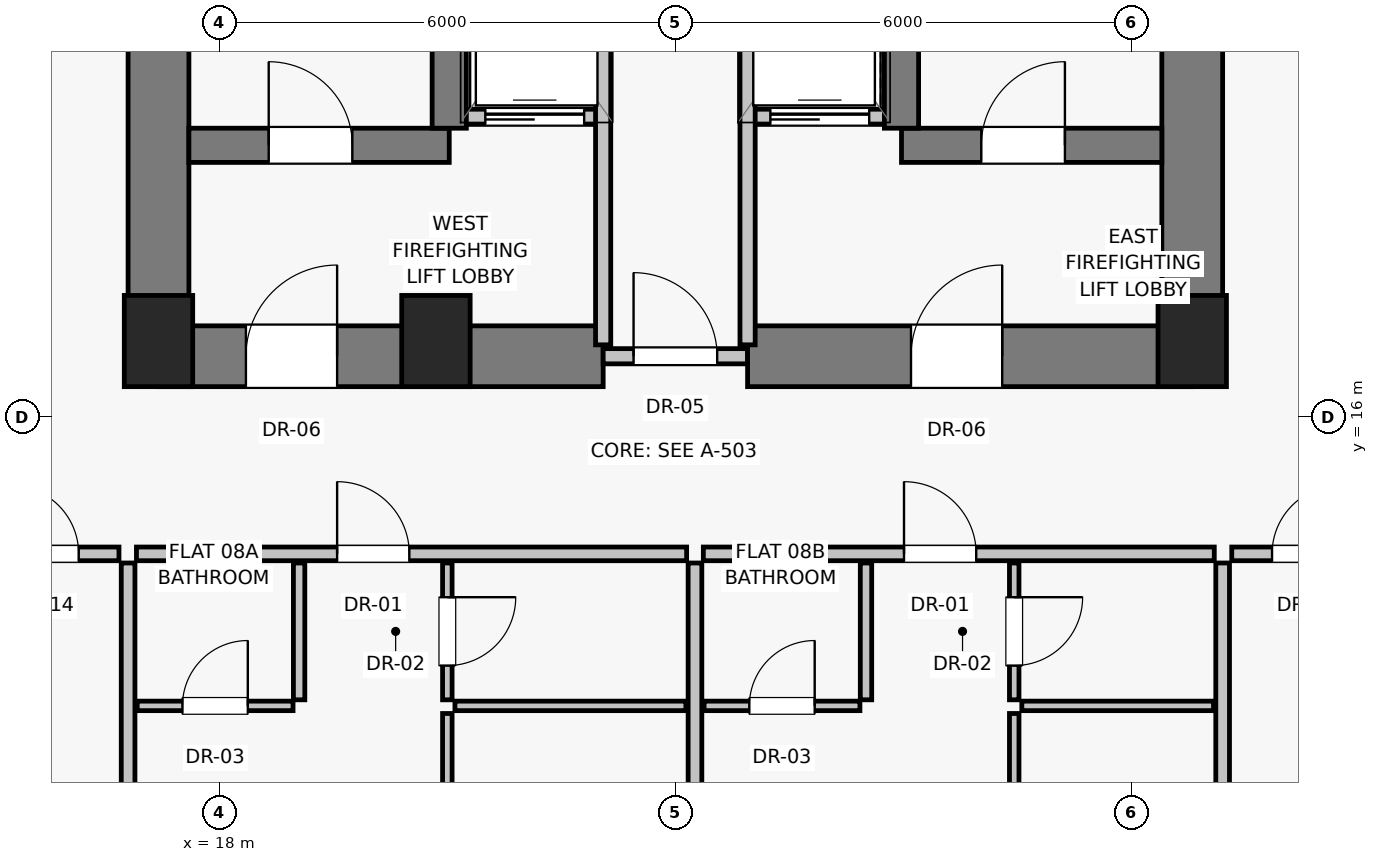
"""IFC4 building model, lengths in metres.
Left out: names, types, materials, properties, quantities, classifications, styles, units other than length and angle.
Written with IfcOpenShell. Run it as: python <this file> out.ifc"""

import sys

from ifc_helpers import new_model, si_unit, direction, frame, frame_2d, origin, origin_2d, place, context, subcontext, project, spatial, rectangle, extrude, source, transform, mapped, element, fill, save


model = new_model("IFC4")
c1 = context("Model", 3, precision=1e-05, world=origin(), true_north=direction((0.0, 1.0)))
c2 = subcontext(c1, "Body", "Model", "MODEL_VIEW")
j1 = project(units=[si_unit("LENGTHUNIT", "METRE"), si_unit("PLANEANGLEUNIT", "RADIAN")], contexts=[c1])
p1 = place(None, origin())
s1 = spatial("IfcSite", under=j1, at=p1, CompositionType="ELEMENT")
p2 = place(p1, origin())
s2 = spatial("IfcBuilding", under=s1, at=p2, CompositionType="ELEMENT")
p3 = place(p2, frame((0.0, 0.0, 33.8)))
s3 = spatial("IfcBuildingStorey", under=s2, at=p3, CompositionType="ELEMENT", Elevation=33.8)
for number, where, z_axis, x_axis in (
    (1, (17.2, 17.0, 0.0), (0.0, 0.0, 1.0), (1.0, 0.0, 0.0)),
    (2, (20.85, 17.0, 0.0), (0.0, 0.0, 1.0), (1.0, 0.0, 0.0)),
    (3, (30.8, 17.0, 0.0), (0.0, 0.0, 1.0), (1.0, 0.0, 0.0)),
):
    element("IfcColumn", number, at=place(p3, frame(where, z_axis=z_axis, x_axis=x_axis)), inside=s3, PredefinedType="PILASTER", context=c2, shape_type="SweptSolid", body=[
        extrude(rectangle(XDim=0.9, YDim=1.2, at=origin_2d()), origin(), (0.0, 0.0, 1.0), 3.25),
    ])
for number, where, z_axis, x_axis in (
    (4, (17.2, 16.8, 0.0), (0.0, 0.0, 1.0), (0.0, 1.0, 0.0)),
    (5, (30.8, 16.8, 0.0), (0.0, 0.0, 1.0), (0.0, 1.0, 0.0)),
):
    element("IfcWall", number, at=place(p3, frame(where, z_axis=z_axis, x_axis=x_axis)), inside=s3, PredefinedType="SHEAR", context=c2, shape_type="SweptSolid", body=[
        extrude(rectangle(XDim=14.2, YDim=0.8, at=frame_2d((7.1, 0.0))), origin(), (0.0, 0.0, 1.0), 3.0),
    ])
p4 = place(p3, frame((17.2, 16.8, 0.0), z_axis=(0.0, 0.0, 1.0), x_axis=(1.0, 0.0, 0.0)))
e6 = element("IfcWall", 6, at=p4, inside=s3, PredefinedType="SHEAR", context=c2, shape_type="SweptSolid", body=[
    extrude(rectangle(XDim=5.85, YDim=0.8, at=frame_2d((2.925, 0.0))), origin(), (0.0, 0.0, 1.0), 3.0),
])
p5 = place(p4, frame((1.15, 0.0, 0.0)))
e7 = element("IfcOpeningElement", 7, at=p5, cuts=e6, PredefinedType="OPENING", context=c2, shape_type="SweptSolid", body=[
    extrude(rectangle(XDim=1.2, YDim=2.03, at=frame_2d((0.6, 1.015))), frame((0.0, 0.41, 0.0), z_axis=(0.0, -1.0, 0.0), x_axis=(1.0, 0.0, 0.0)), (0.0, 0.0, 1.0), 0.82),
])
p6 = place(p3, frame((23.05, 16.8, 0.0), z_axis=(0.0, 0.0, 1.0), x_axis=(1.0, 0.0, 0.0)))
e8 = element("IfcWall", 8, at=p6, inside=s3, PredefinedType="SOLIDWALL", context=c2, shape_type="SweptSolid", body=[
    extrude(rectangle(XDim=1.9, YDim=0.2, at=frame_2d((0.95, 0.0))), origin(), (0.0, 0.0, 1.0), 2.15),
])
p7 = place(p6, frame((0.4, 0.0, 0.0)))
e9 = element("IfcOpeningElement", 9, at=p7, cuts=e8, PredefinedType="OPENING", context=c2, shape_type="SweptSolid", body=[
    extrude(rectangle(XDim=1.1, YDim=2.03, at=frame_2d((0.55, 1.015))), frame((0.0, 0.11, 0.0), z_axis=(0.0, -1.0, 0.0), x_axis=(1.0, 0.0, 0.0)), (0.0, 0.0, 1.0), 0.22),
])
p8 = place(p3, frame((24.95, 16.8, 0.0), z_axis=(0.0, 0.0, 1.0), x_axis=(1.0, 0.0, 0.0)))
e10 = element("IfcWall", 10, at=p8, inside=s3, PredefinedType="SHEAR", context=c2, shape_type="SweptSolid", body=[
    extrude(rectangle(XDim=5.85, YDim=0.8, at=frame_2d((2.925, 0.0))), origin(), (0.0, 0.0, 1.0), 3.0),
])
p9 = place(p8, frame((2.15, 0.0, 0.0)))
e11 = element("IfcOpeningElement", 11, at=p9, cuts=e10, PredefinedType="OPENING", context=c2, shape_type="SweptSolid", body=[
    extrude(rectangle(XDim=1.2, YDim=2.03, at=frame_2d((0.6, 1.015))), frame((0.0, 0.41, 0.0), z_axis=(0.0, -1.0, 0.0), x_axis=(1.0, 0.0, 0.0)), (0.0, 0.0, 1.0), 0.82),
])
p10 = place(p3, frame((17.6, 19.575, 0.0), z_axis=(0.0, 0.0, 1.0), x_axis=(1.0, 0.0, 0.0)))
e12 = element("IfcWall", 12, at=p10, inside=s3, PredefinedType="SHEAR", context=c2, shape_type="SweptSolid", body=[
    extrude(rectangle(XDim=3.425, YDim=0.45, at=frame_2d((1.712, 0.0))), origin(), (0.0, 0.0, 1.0), 3.0),
])
p11 = place(p10, frame((1.05, 0.0, 0.0)))
e13 = element("IfcOpeningElement", 13, at=p11, cuts=e12, PredefinedType="OPENING", context=c2, shape_type="SweptSolid", body=[
    extrude(rectangle(XDim=1.1, YDim=2.03, at=frame_2d((0.55, 1.015))), frame((0.0, 0.235, 0.0), z_axis=(0.0, -1.0, 0.0), x_axis=(1.0, 0.0, 0.0)), (0.0, 0.0, 1.0), 0.47),
])
p12 = place(p3, frame((21.2, 19.95, 0.0), z_axis=(0.0, 0.0, 1.0), x_axis=(1.0, 0.0, 0.0)))
e14 = element("IfcWall", 14, at=p12, inside=s3, PredefinedType="SOLIDWALL", context=c2, shape_type="SweptSolid", body=[
    extrude(rectangle(XDim=1.85, YDim=0.2, at=frame_2d((0.925, 0.0))), origin(), (0.0, 0.0, 1.0), 3.0),
])
p13 = place(p12, frame((0.3, 0.0, 0.0)))
e15 = element("IfcOpeningElement", 15, at=p13, cuts=e14, PredefinedType="OPENING", context=c2, shape_type="SweptSolid", body=[
    extrude(rectangle(XDim=1.3, YDim=2.25, at=frame_2d((0.65, 1.125))), frame((0.0, 0.11, 0.0), z_axis=(0.0, -1.0, 0.0), x_axis=(1.0, 0.0, 0.0)), (0.0, 0.0, 1.0), 0.22),
])
p14 = place(p3, frame((24.95, 19.95, 0.0), z_axis=(0.0, 0.0, 1.0), x_axis=(1.0, 0.0, 0.0)))
e16 = element("IfcWall", 16, at=p14, inside=s3, PredefinedType="SOLIDWALL", context=c2, shape_type="SweptSolid", body=[
    extrude(rectangle(XDim=1.85, YDim=0.2, at=frame_2d((0.925, 0.0))), origin(), (0.0, 0.0, 1.0), 3.0),
])
p15 = place(p14, frame((0.3, 0.0, 0.0)))
e17 = element("IfcOpeningElement", 17, at=p15, cuts=e16, PredefinedType="OPENING", context=c2, shape_type="SweptSolid", body=[
    extrude(rectangle(XDim=1.3, YDim=2.25, at=frame_2d((0.65, 1.125))), frame((0.0, 0.11, 0.0), z_axis=(0.0, -1.0, 0.0), x_axis=(1.0, 0.0, 0.0)), (0.0, 0.0, 1.0), 0.22),
])
p16 = place(p3, frame((26.975, 19.575, 0.0), z_axis=(0.0, 0.0, 1.0), x_axis=(1.0, 0.0, 0.0)))
e18 = element("IfcWall", 18, at=p16, inside=s3, PredefinedType="SHEAR", context=c2, shape_type="SweptSolid", body=[
    extrude(rectangle(XDim=3.425, YDim=0.45, at=frame_2d((1.712, 0.0))), origin(), (0.0, 0.0, 1.0), 3.0),
])
p17 = place(p16, frame((1.05, 0.0, 0.0)))
e19 = element("IfcOpeningElement", 19, at=p17, cuts=e18, PredefinedType="OPENING", context=c2, shape_type="SweptSolid", body=[
    extrude(rectangle(XDim=1.1, YDim=2.03, at=frame_2d((0.55, 1.015))), frame((0.0, 0.235, 0.0), z_axis=(0.0, -1.0, 0.0), x_axis=(1.0, 0.0, 0.0)), (0.0, 0.0, 1.0), 0.47),
])
for number, where, z_axis, x_axis in (
    (20, (21.025, 19.8, 0.0), (0.0, 0.0, 1.0), (0.0, 1.0, 0.0)),
    (21, (26.975, 19.8, 0.0), (0.0, 0.0, 1.0), (0.0, 1.0, 0.0)),
):
    element("IfcWall", number, at=place(p3, frame(where, z_axis=z_axis, x_axis=x_axis)), inside=s3, PredefinedType="SHEAR", context=c2, shape_type="SweptSolid", body=[
        extrude(rectangle(XDim=8.825, YDim=0.45, at=frame_2d((4.413, 0.0))), origin(), (0.0, 0.0, 1.0), 3.0),
    ])
for number, where, z_axis, x_axis in (
    (22, (23.05, 16.95, 0.0), (0.0, 0.0, 1.0), (0.0, 1.0, 0.0)),
    (23, (24.95, 16.95, 0.0), (0.0, 0.0, 1.0), (0.0, 1.0, 0.0)),
):
    element("IfcWall", number, at=place(p3, frame(where, z_axis=z_axis, x_axis=x_axis)), inside=s3, PredefinedType="SOLIDWALL", context=c2, shape_type="SweptSolid", body=[
        extrude(rectangle(XDim=5.6, YDim=0.2, at=frame_2d((2.8, 0.0))), origin(), (0.0, 0.0, 1.0), 3.0),
    ])
p18 = place(p3, frame((16.8, 14.08, 0.0), z_axis=(0.0, 0.0, 1.0), x_axis=(0.0, -1.0, 0.0)))
e24 = element("IfcWall", 24, at=p18, inside=s3, PredefinedType="PARTITIONING", context=c2, shape_type="SweptSolid", body=[
    extrude(rectangle(XDim=11.292, YDim=0.18, at=frame_2d((5.646, 0.0))), origin(), (0.0, 0.0, 1.0), 3.0),
])
p19 = place(p3, frame((31.2, 14.08, 0.0), z_axis=(0.0, 0.0, 1.0), x_axis=(0.0, -1.0, 0.0)))
e25 = element("IfcWall", 25, at=p19, inside=s3, PredefinedType="PARTITIONING", context=c2, shape_type="SweptSolid", body=[
    extrude(rectangle(XDim=10.552, YDim=0.18, at=frame_2d((5.276, 0.0))), origin(), (0.0, 0.0, 1.0), 3.0),
])
p20 = place(p3, frame((16.91, 14.2, 0.0), z_axis=(0.0, 0.0, 1.0), x_axis=(1.0, 0.0, 0.0)))
e26 = element("IfcWall", 26, at=p20, inside=s3, PredefinedType="PARTITIONING", context=c2, shape_type="SweptSolid", body=[
    extrude(rectangle(XDim=7.238, YDim=0.18, at=frame_2d((3.619, 0.0))), origin(), (0.0, 0.0, 1.0), 3.0),
])
p21 = place(p20, frame((2.64, 0.0, 0.0)))
e27 = element("IfcOpeningElement", 27, at=p21, cuts=e26, PredefinedType="OPENING", context=c2, shape_type="SweptSolid", body=[
    extrude(rectangle(XDim=0.95, YDim=2.02, at=frame_2d((0.475, 1.01))), frame((0.0, 0.1, 0.0), z_axis=(0.0, -1.0, 0.0), x_axis=(1.0, 0.0, 0.0)), (0.0, 0.0, 1.0), 0.2),
])
p22 = place(p3, frame((19.05, 14.08, 0.0), z_axis=(0.0, 0.0, 1.0), x_axis=(0.0, -1.0, 0.0)))
e28 = element("IfcWall", 28, at=p22, inside=s3, PredefinedType="PARTITIONING", context=c2, shape_type="SweptSolid", body=[
    extrude(rectangle(XDim=1.8, YDim=0.15, at=frame_2d((0.9, 0.0))), origin(), (0.0, 0.0, 1.0), 3.0),
])
p23 = place(p3, frame((16.92, 12.2, 0.0), z_axis=(0.0, 0.0, 1.0), x_axis=(1.0, 0.0, 0.0)))
e29 = element("IfcWall", 29, at=p23, inside=s3, PredefinedType="PARTITIONING", context=c2, shape_type="SweptSolid", body=[
    extrude(rectangle(XDim=2.05, YDim=0.125, at=frame_2d((1.025, 0.0))), origin(), (0.0, 0.0, 1.0), 3.0),
])
p24 = place(p23, frame((0.595, 0.0, 0.0)))
e30 = element("IfcOpeningElement", 30, at=p24, cuts=e29, PredefinedType="OPENING", context=c2, shape_type="SweptSolid", body=[
    extrude(rectangle(XDim=0.86, YDim=2.01, at=frame_2d((0.43, 1.005))), frame((0.0, 0.073, 0.0), z_axis=(0.0, -1.0, 0.0), x_axis=(1.0, 0.0, 0.0)), (0.0, 0.0, 1.0), 0.145),
])
p25 = place(p3, frame((21.0, 14.08, 0.0), z_axis=(0.0, 0.0, 1.0), x_axis=(0.0, -1.0, 0.0)))
e31 = element("IfcWall", 31, at=p25, inside=s3, PredefinedType="PARTITIONING", context=c2, shape_type="SweptSolid", body=[
    extrude(rectangle(XDim=1.8, YDim=0.125, at=frame_2d((0.9, 0.0))), origin(), (0.0, 0.0, 1.0), 3.0),
])
p26 = place(p25, frame((0.45, 0.0, 0.0)))
e32 = element("IfcOpeningElement", 32, at=p26, cuts=e31, PredefinedType="OPENING", context=c2, shape_type="SweptSolid", body=[
    extrude(rectangle(XDim=0.9, YDim=2.01, at=frame_2d((0.45, 1.005))), frame((0.0, 0.073, 0.0), z_axis=(0.0, -1.0, 0.0), x_axis=(1.0, 0.0, 0.0)), (0.0, 0.0, 1.0), 0.145),
])
p27 = place(p3, frame((21.1, 12.2, 0.0), z_axis=(0.0, 0.0, 1.0), x_axis=(1.0, 0.0, 0.0)))
e33 = element("IfcWall", 33, at=p27, inside=s3, PredefinedType="PARTITIONING", context=c2, shape_type="SweptSolid", body=[
    extrude(rectangle(XDim=3.038, YDim=0.125, at=frame_2d((1.519, 0.0))), origin(), (0.0, 0.0, 1.0), 3.0),
])
p28 = place(p3, frame((21.0, 12.1, 0.0), z_axis=(0.0, 0.0, 1.0), x_axis=(0.0, -1.0, 0.0)))
e34 = element("IfcWall", 34, at=p28, inside=s3, PredefinedType="PARTITIONING", context=c2, shape_type="SweptSolid", body=[
    extrude(rectangle(XDim=9.096, YDim=0.125, at=frame_2d((4.548, 0.0))), origin(), (0.0, 0.0, 1.0), 3.0),
])
p29 = place(p28, frame((2.851, 0.0, 0.0)))
e35 = element("IfcOpeningElement", 35, at=p29, cuts=e34, PredefinedType="OPENING", context=c2, shape_type="SweptSolid", body=[
    extrude(rectangle(XDim=0.9, YDim=2.01, at=frame_2d((0.45, 1.005))), frame((0.0, 0.073, 0.0), z_axis=(0.0, -1.0, 0.0), x_axis=(1.0, 0.0, 0.0)), (0.0, 0.0, 1.0), 0.145),
])
p30 = place(p3, frame((24.258, 14.08, 0.0), z_axis=(0.0, 0.0, 1.0), x_axis=(0.0, -1.0, 0.0)))
e36 = element("IfcWall", 36, at=p30, inside=s3, PredefinedType="PARTITIONING", context=c2, shape_type="SweptSolid", body=[
    extrude(rectangle(XDim=10.909, YDim=0.18, at=frame_2d((5.455, 0.0))), origin(), (0.0, 0.0, 1.0), 3.0),
])
p31 = place(p3, frame((24.368, 14.2, 0.0), z_axis=(0.0, 0.0, 1.0), x_axis=(1.0, 0.0, 0.0)))
e37 = element("IfcWall", 37, at=p31, inside=s3, PredefinedType="PARTITIONING", context=c2, shape_type="SweptSolid", body=[
    extrude(rectangle(XDim=6.722, YDim=0.18, at=frame_2d((3.361, 0.0))), origin(), (0.0, 0.0, 1.0), 3.0),
])
p32 = place(p31, frame((2.64, 0.0, 0.0)))
e38 = element("IfcOpeningElement", 38, at=p32, cuts=e37, PredefinedType="OPENING", context=c2, shape_type="SweptSolid", body=[
    extrude(rectangle(XDim=0.95, YDim=2.02, at=frame_2d((0.475, 1.01))), frame((0.0, 0.1, 0.0), z_axis=(0.0, -1.0, 0.0), x_axis=(1.0, 0.0, 0.0)), (0.0, 0.0, 1.0), 0.2),
])
p33 = place(p3, frame((26.508, 14.08, 0.0), z_axis=(0.0, 0.0, 1.0), x_axis=(0.0, -1.0, 0.0)))
e39 = element("IfcWall", 39, at=p33, inside=s3, PredefinedType="PARTITIONING", context=c2, shape_type="SweptSolid", body=[
    extrude(rectangle(XDim=1.8, YDim=0.15, at=frame_2d((0.9, 0.0))), origin(), (0.0, 0.0, 1.0), 3.0),
])
p34 = place(p3, frame((24.378, 12.2, 0.0), z_axis=(0.0, 0.0, 1.0), x_axis=(1.0, 0.0, 0.0)))
e40 = element("IfcWall", 40, at=p34, inside=s3, PredefinedType="PARTITIONING", context=c2, shape_type="SweptSolid", body=[
    extrude(rectangle(XDim=2.05, YDim=0.125, at=frame_2d((1.025, 0.0))), origin(), (0.0, 0.0, 1.0), 3.0),
])
p35 = place(p34, frame((0.595, 0.0, 0.0)))
e41 = element("IfcOpeningElement", 41, at=p35, cuts=e40, PredefinedType="OPENING", context=c2, shape_type="SweptSolid", body=[
    extrude(rectangle(XDim=0.86, YDim=2.01, at=frame_2d((0.43, 1.005))), frame((0.0, 0.073, 0.0), z_axis=(0.0, -1.0, 0.0), x_axis=(1.0, 0.0, 0.0)), (0.0, 0.0, 1.0), 0.145),
])
p36 = place(p3, frame((28.458, 14.08, 0.0), z_axis=(0.0, 0.0, 1.0), x_axis=(0.0, -1.0, 0.0)))
e42 = element("IfcWall", 42, at=p36, inside=s3, PredefinedType="PARTITIONING", context=c2, shape_type="SweptSolid", body=[
    extrude(rectangle(XDim=1.8, YDim=0.125, at=frame_2d((0.9, 0.0))), origin(), (0.0, 0.0, 1.0), 3.0),
])
p37 = place(p36, frame((0.45, 0.0, 0.0)))
e43 = element("IfcOpeningElement", 43, at=p37, cuts=e42, PredefinedType="OPENING", context=c2, shape_type="SweptSolid", body=[
    extrude(rectangle(XDim=0.9, YDim=2.01, at=frame_2d((0.45, 1.005))), frame((0.0, 0.073, 0.0), z_axis=(0.0, -1.0, 0.0), x_axis=(1.0, 0.0, 0.0)), (0.0, 0.0, 1.0), 0.145),
])
p38 = place(p3, frame((28.558, 12.2, 0.0), z_axis=(0.0, 0.0, 1.0), x_axis=(1.0, 0.0, 0.0)))
e44 = element("IfcWall", 44, at=p38, inside=s3, PredefinedType="PARTITIONING", context=c2, shape_type="SweptSolid", body=[
    extrude(rectangle(XDim=2.522, YDim=0.125, at=frame_2d((1.261, 0.0))), origin(), (0.0, 0.0, 1.0), 3.0),
])
p39 = place(p3, frame((28.458, 12.1, 0.0), z_axis=(0.0, 0.0, 1.0), x_axis=(0.0, -1.0, 0.0)))
e45 = element("IfcWall", 45, at=p39, inside=s3, PredefinedType="PARTITIONING", context=c2, shape_type="SweptSolid", body=[
    extrude(rectangle(XDim=8.713, YDim=0.125, at=frame_2d((4.356, 0.0))), origin(), (0.0, 0.0, 1.0), 3.0),
])
p40 = place(p39, frame((2.72, 0.0, 0.0)))
e46 = element("IfcOpeningElement", 46, at=p40, cuts=e45, PredefinedType="OPENING", context=c2, shape_type="SweptSolid", body=[
    extrude(rectangle(XDim=0.9, YDim=2.01, at=frame_2d((0.45, 1.005))), frame((0.0, 0.073, 0.0), z_axis=(0.0, -1.0, 0.0), x_axis=(1.0, 0.0, 0.0)), (0.0, 0.0, 1.0), 0.145),
])
p41 = place(p3, frame((14.72, 14.2, 0.0), z_axis=(0.0, 0.0, 1.0), x_axis=(1.0, 0.0, 0.0)))
e47 = element("IfcWall", 47, at=p41, inside=s3, PredefinedType="PARTITIONING", context=c2, shape_type="SweptSolid", body=[
    extrude(rectangle(XDim=1.96, YDim=0.18, at=frame_2d((0.98, 0.0))), origin(), (0.0, 0.0, 1.0), 3.0),
])
p42 = place(p41, frame((0.53, 0.0, 0.0)))
e48 = element("IfcOpeningElement", 48, at=p42, cuts=e47, PredefinedType="OPENING", context=c2, shape_type="SweptSolid", body=[
    extrude(rectangle(XDim=0.9, YDim=2.01, at=frame_2d((0.45, 1.005))), frame((0.0, 0.1, 0.0), z_axis=(0.0, -1.0, 0.0), x_axis=(1.0, 0.0, 0.0)), (0.0, 0.0, 1.0), 0.2),
])
p43 = place(p3, frame((31.32, 14.2, 0.0), z_axis=(0.0, 0.0, 1.0), x_axis=(1.0, 0.0, 0.0)))
e49 = element("IfcWall", 49, at=p43, inside=s3, PredefinedType="PARTITIONING", context=c2, shape_type="SweptSolid", body=[
    extrude(rectangle(XDim=1.96, YDim=0.18, at=frame_2d((0.98, 0.0))), origin(), (0.0, 0.0, 1.0), 3.0),
])
p44 = place(p43, frame((0.53, 0.0, 0.0)))
e50 = element("IfcOpeningElement", 50, at=p44, cuts=e49, PredefinedType="OPENING", context=c2, shape_type="SweptSolid", body=[
    extrude(rectangle(XDim=0.9, YDim=2.01, at=frame_2d((0.45, 1.005))), frame((0.0, 0.1, 0.0), z_axis=(0.0, -1.0, 0.0), x_axis=(1.0, 0.0, 0.0)), (0.0, 0.0, 1.0), 0.2),
])
m1 = source(origin(), c2, "Body", "SweptSolid", [
    extrude(rectangle(XDim=1.2, YDim=2.03, at=frame_2d((0.6, 1.015))), frame((0.0, 0.025, 0.0), z_axis=(0.0, -1.0, 0.0), x_axis=(1.0, 0.0, 0.0)), (0.0, 0.0, 1.0), 0.05),
])
p45 = place(p5, origin())
e51 = element("IfcDoor", 51, at=p45, inside=s3, OperationType="SINGLE_SWING_RIGHT", PredefinedType="DOOR", context=c2, shape_type="MappedRepresentation", body=[
    mapped(m1, transform((0.0, 0.0, 0.0), scale=1.0)),
])
fill(e7, e51)
m2 = source(origin(), c2, "Body", "SweptSolid", [
    extrude(rectangle(XDim=1.1, YDim=2.03, at=frame_2d((0.55, 1.015))), frame((0.0, 0.025, 0.0), z_axis=(0.0, -1.0, 0.0), x_axis=(1.0, 0.0, 0.0)), (0.0, 0.0, 1.0), 0.05),
])
p46 = place(p7, origin())
e52 = element("IfcDoor", 52, at=p46, inside=s3, OperationType="SINGLE_SWING_LEFT", PredefinedType="DOOR", context=c2, shape_type="MappedRepresentation", body=[
    mapped(m2, transform((0.0, 0.0, 0.0), scale=1.0)),
])
fill(e9, e52)
p47 = place(p9, origin())
e53 = element("IfcDoor", 53, at=p47, inside=s3, OperationType="SINGLE_SWING_RIGHT", PredefinedType="DOOR", context=c2, shape_type="MappedRepresentation", body=[
    mapped(m1, transform((0.0, 0.0, 0.0), scale=1.0)),
])
fill(e11, e53)
p48 = place(p11, origin())
e54 = element("IfcDoor", 54, at=p48, inside=s3, OperationType="SINGLE_SWING_LEFT", PredefinedType="DOOR", context=c2, shape_type="MappedRepresentation", body=[
    mapped(m2, transform((0.0, 0.0, 0.0), scale=1.0)),
])
fill(e13, e54)
m3 = source(origin(), c2, "Body", "SweptSolid", [
    extrude(rectangle(XDim=1.3, YDim=2.25, at=frame_2d((0.65, 1.125))), frame((0.0, 0.025, 0.0), z_axis=(0.0, -1.0, 0.0), x_axis=(1.0, 0.0, 0.0)), (0.0, 0.0, 1.0), 0.05),
])
p49 = place(p13, origin())
e55 = element("IfcDoor", 55, at=p49, inside=s3, OperationType="SLIDING_TO_LEFT", PredefinedType="DOOR", context=c2, shape_type="MappedRepresentation", body=[
    mapped(m3, transform((0.0, 0.0, 0.0), scale=1.0)),
])
fill(e15, e55)
p50 = place(p15, origin())
e56 = element("IfcDoor", 56, at=p50, inside=s3, OperationType="SLIDING_TO_LEFT", PredefinedType="DOOR", context=c2, shape_type="MappedRepresentation", body=[
    mapped(m3, transform((0.0, 0.0, 0.0), scale=1.0)),
])
fill(e17, e56)
p51 = place(p17, origin())
e57 = element("IfcDoor", 57, at=p51, inside=s3, OperationType="SINGLE_SWING_RIGHT", PredefinedType="DOOR", context=c2, shape_type="MappedRepresentation", body=[
    mapped(m2, transform((0.0, 0.0, 0.0), scale=1.0)),
])
fill(e19, e57)
m4 = source(origin(), c2, "Body", "SweptSolid", [
    extrude(rectangle(XDim=0.95, YDim=2.02, at=frame_2d((0.475, 1.01))), frame((0.0, 0.025, 0.0), z_axis=(0.0, -1.0, 0.0), x_axis=(1.0, 0.0, 0.0)), (0.0, 0.0, 1.0), 0.05),
])
p52 = place(p21, origin())
e58 = element("IfcDoor", 58, at=p52, inside=s3, OperationType="SINGLE_SWING_LEFT", PredefinedType="DOOR", context=c2, shape_type="MappedRepresentation", body=[
    mapped(m4, transform((0.0, 0.0, 0.0), scale=1.0)),
])
fill(e27, e58)
m5 = source(origin(), c2, "Body", "SweptSolid", [
    extrude(rectangle(XDim=0.86, YDim=2.01, at=frame_2d((0.43, 1.005))), frame((0.0, 0.025, 0.0), z_axis=(0.0, -1.0, 0.0), x_axis=(1.0, 0.0, 0.0)), (0.0, 0.0, 1.0), 0.05),
])
p53 = place(p24, origin())
e59 = element("IfcDoor", 59, at=p53, inside=s3, OperationType="SINGLE_SWING_RIGHT", PredefinedType="DOOR", context=c2, shape_type="MappedRepresentation", body=[
    mapped(m5, transform((0.0, 0.0, 0.0), scale=1.0)),
])
fill(e30, e59)
m6 = source(origin(), c2, "Body", "SweptSolid", [
    extrude(rectangle(XDim=0.9, YDim=2.01, at=frame_2d((0.45, 1.005))), frame((0.0, 0.025, 0.0), z_axis=(0.0, -1.0, 0.0), x_axis=(1.0, 0.0, 0.0)), (0.0, 0.0, 1.0), 0.05),
])
p54 = place(p26, origin())
e60 = element("IfcDoor", 60, at=p54, inside=s3, OperationType="SINGLE_SWING_LEFT", PredefinedType="DOOR", context=c2, shape_type="MappedRepresentation", body=[
    mapped(m6, transform((0.0, 0.0, 0.0), scale=1.0)),
])
fill(e32, e60)
p55 = place(p32, origin())
e61 = element("IfcDoor", 61, at=p55, inside=s3, OperationType="SINGLE_SWING_LEFT", PredefinedType="DOOR", context=c2, shape_type="MappedRepresentation", body=[
    mapped(m4, transform((0.0, 0.0, 0.0), scale=1.0)),
])
fill(e38, e61)
p56 = place(p35, origin())
e62 = element("IfcDoor", 62, at=p56, inside=s3, OperationType="SINGLE_SWING_RIGHT", PredefinedType="DOOR", context=c2, shape_type="MappedRepresentation", body=[
    mapped(m5, transform((0.0, 0.0, 0.0), scale=1.0)),
])
fill(e41, e62)
p57 = place(p37, origin())
e63 = element("IfcDoor", 63, at=p57, inside=s3, OperationType="SINGLE_SWING_LEFT", PredefinedType="DOOR", context=c2, shape_type="MappedRepresentation", body=[
    mapped(m6, transform((0.0, 0.0, 0.0), scale=1.0)),
])
fill(e43, e63)
p58 = place(p42, origin())
e64 = element("IfcDoor", 64, at=p58, inside=s3, OperationType="SINGLE_SWING_LEFT", PredefinedType="DOOR", context=c2, shape_type="MappedRepresentation", body=[
    mapped(m6, transform((0.0, 0.0, 0.0), scale=1.0)),
])
fill(e48, e64)
p59 = place(p44, origin())
e65 = element("IfcDoor", 65, at=p59, inside=s3, OperationType="SINGLE_SWING_RIGHT", PredefinedType="DOOR", context=c2, shape_type="MappedRepresentation", body=[
    mapped(m6, transform((0.0, 0.0, 0.0), scale=1.0)),
])
fill(e50, e65)
save(model, sys.argv[1])
